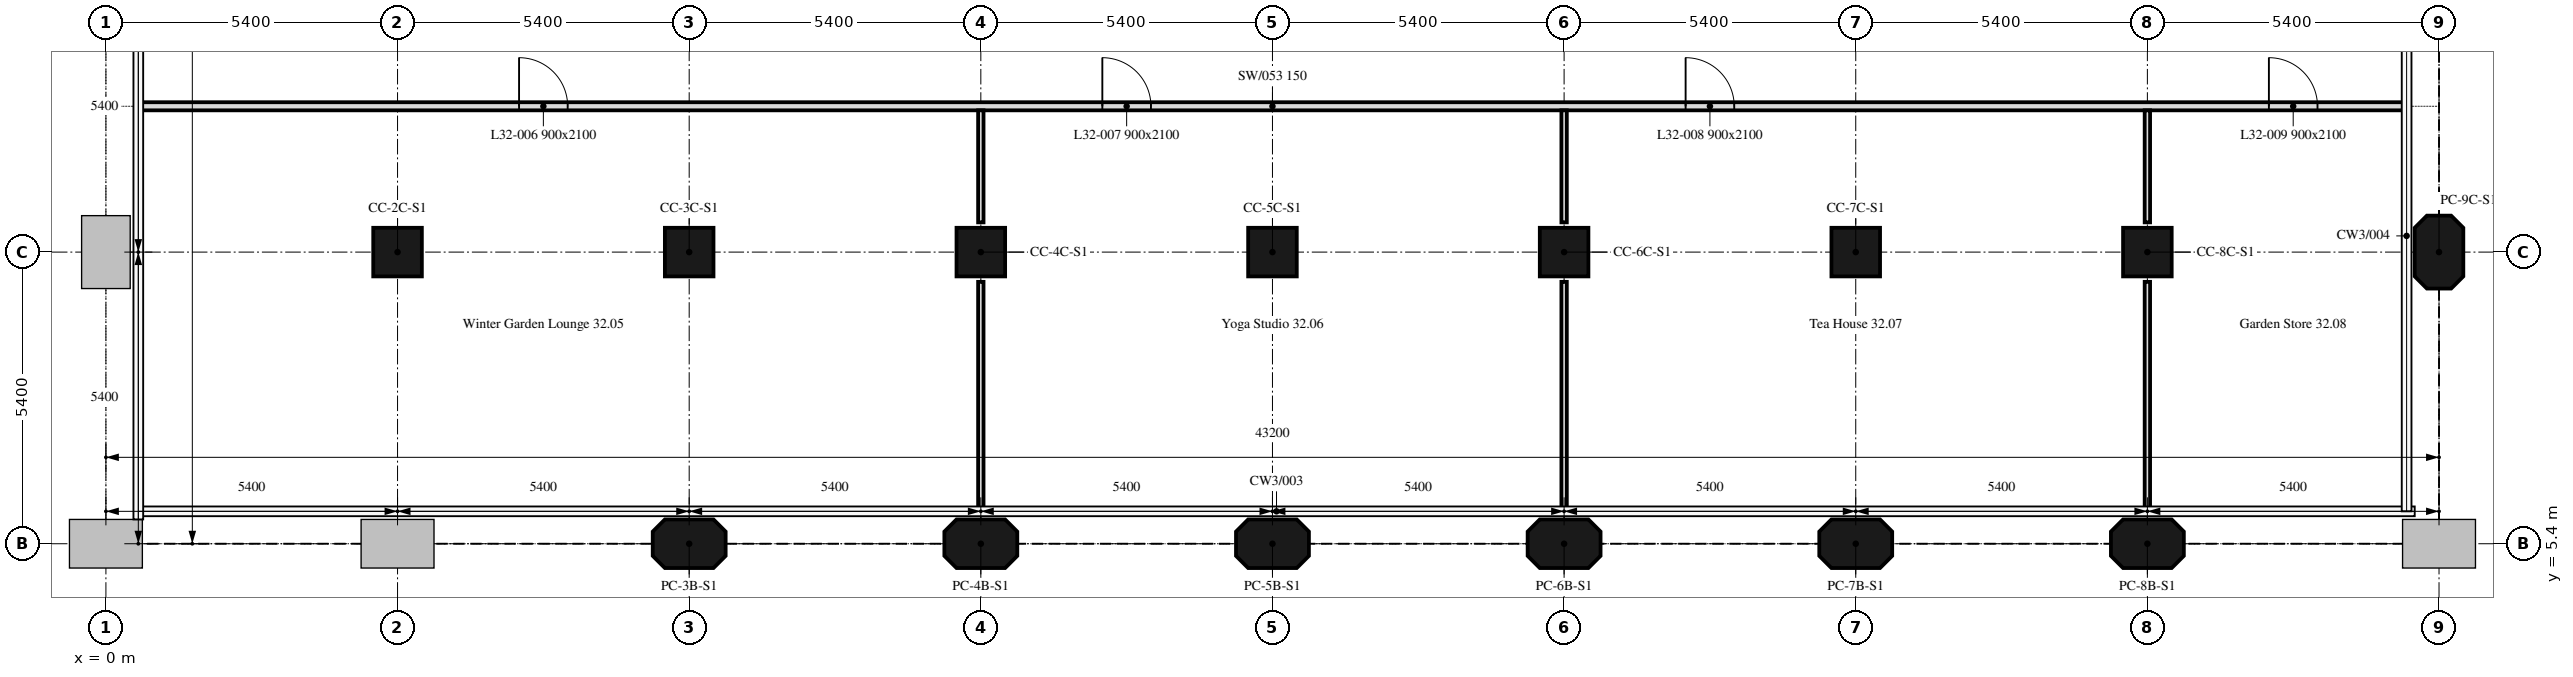
"""IFC4 building model, lengths in metres.
Left out: names, types, materials, properties, quantities, classifications, styles, units other than length and angle.
Written with IfcOpenShell. Run it as: python <this file> out.ifc"""

import sys

from ifc_helpers import new_model, si_unit, direction, frame, frame_2d, origin, origin_2d, place, context, subcontext, project, spatial, polyline, rectangle, outline, extrude, element, fill, save


model = new_model("IFC4")
c1 = context("Model", 3, precision=1e-05, world=origin(), true_north=direction((0.0, 1.0)))
c2 = subcontext(c1, "Body", "Model", "MODEL_VIEW")
j1 = project(units=[si_unit("LENGTHUNIT", "METRE"), si_unit("PLANEANGLEUNIT", "RADIAN")], contexts=[c1])
p1 = place(None, origin())
s1 = spatial("IfcSite", under=j1, at=p1, CompositionType="ELEMENT")
p2 = place(p1, origin())
s2 = spatial("IfcBuilding", under=s1, at=p2, CompositionType="ELEMENT")
p3 = place(p2, frame((0.0, 0.0, 138.4)))
s3 = spatial("IfcBuildingStorey", under=s2, at=p3, CompositionType="ELEMENT", Elevation=138.4)
for number, where, z_axis, x_axis in (
    (1, (10.8, 5.4, 0.0), (0.0, 0.0, 1.0), (1.0, 0.0, 0.0)),
    (2, (16.2, 5.4, 0.0), (0.0, 0.0, 1.0), (1.0, 0.0, 0.0)),
    (3, (21.6, 5.4, 0.0), (0.0, 0.0, 1.0), (1.0, 0.0, 0.0)),
    (4, (27.0, 5.4, 0.0), (0.0, 0.0, 1.0), (1.0, 0.0, 0.0)),
    (5, (32.4, 5.4, 0.0), (0.0, 0.0, 1.0), (1.0, 0.0, 0.0)),
    (6, (37.8, 5.4, 0.0), (0.0, 0.0, 1.0), (1.0, 0.0, 0.0)),
):
    element("IfcColumn", number, at=place(p3, frame(where, z_axis=z_axis, x_axis=x_axis)), inside=s3, PredefinedType="COLUMN", context=c2, shape_type="SweptSolid", body=[
        extrude(outline(polyline([(-0.45, -0.45), (0.45, -0.45), (0.675, -0.225), (0.675, 0.225), (0.45, 0.45), (-0.45, 0.45), (-0.675, 0.225), (-0.675, -0.225), (-0.45, -0.45)])), origin(), (0.0, 0.0, 1.0), 4.5),
    ])
for number, where, z_axis, x_axis in (
    (7, (5.4, 10.8, 0.0), (0.0, 0.0, 1.0), (1.0, 0.0, 0.0)),
    (8, (10.8, 10.8, 0.0), (0.0, 0.0, 1.0), (1.0, 0.0, 0.0)),
    (9, (16.2, 10.8, 0.0), (0.0, 0.0, 1.0), (1.0, 0.0, 0.0)),
    (10, (21.6, 10.8, 0.0), (0.0, 0.0, 1.0), (1.0, 0.0, 0.0)),
    (11, (27.0, 10.8, 0.0), (0.0, 0.0, 1.0), (1.0, 0.0, 0.0)),
    (12, (32.4, 10.8, 0.0), (0.0, 0.0, 1.0), (1.0, 0.0, 0.0)),
    (13, (37.8, 10.8, 0.0), (0.0, 0.0, 1.0), (1.0, 0.0, 0.0)),
):
    element("IfcColumn", number, at=place(p3, frame(where, z_axis=z_axis, x_axis=x_axis)), inside=s3, PredefinedType="COLUMN", context=c2, shape_type="SweptSolid", body=[
        extrude(rectangle(XDim=0.9, YDim=0.9, at=origin_2d()), origin(), (0.0, 0.0, 1.0), 4.5),
    ])
p4 = place(p3, frame((43.2, 10.8, 0.0), z_axis=(0.0, 0.0, 1.0), x_axis=(0.0, 1.0, 0.0)))
e14 = element("IfcColumn", 14, at=p4, inside=s3, PredefinedType="COLUMN", context=c2, shape_type="SweptSolid", body=[
    extrude(outline(polyline([(-0.45, -0.45), (0.45, -0.45), (0.675, -0.225), (0.675, 0.225), (0.45, 0.45), (-0.45, 0.45), (-0.675, 0.225), (-0.675, -0.225), (-0.45, -0.45)])), origin(), (0.0, 0.0, 1.0), 4.5),
])
p5 = place(p3, frame((0.6, 13.5, 0.0), z_axis=(0.0, 0.0, 1.0), x_axis=(1.0, 0.0, 0.0)))
e15 = element("IfcWall", 15, at=p5, inside=s3, PredefinedType="PARTITIONING", context=c2, shape_type="SweptSolid", body=[
    extrude(rectangle(XDim=42.0, YDim=0.15, at=frame_2d((21.0, 0.0))), origin(), (0.0, 0.0, 1.0), 4.5),
])
p6 = place(p5, frame((7.05, 0.0, 0.0)))
e16 = element("IfcOpeningElement", 16, at=p6, cuts=e15, PredefinedType="OPENING", context=c2, shape_type="SweptSolid", body=[
    extrude(rectangle(XDim=0.9, YDim=2.1, at=frame_2d((0.45, 1.05))), frame((0.0, 0.075, 0.0), z_axis=(0.0, -1.0, 0.0), x_axis=(1.0, 0.0, 0.0)), (0.0, 0.0, 1.0), 0.15),
])
p7 = place(p5, frame((17.85, 0.0, 0.0)))
e17 = element("IfcOpeningElement", 17, at=p7, cuts=e15, PredefinedType="OPENING", context=c2, shape_type="SweptSolid", body=[
    extrude(rectangle(XDim=0.9, YDim=2.1, at=frame_2d((0.45, 1.05))), frame((0.0, 0.075, 0.0), z_axis=(0.0, -1.0, 0.0), x_axis=(1.0, 0.0, 0.0)), (0.0, 0.0, 1.0), 0.15),
])
p8 = place(p5, frame((28.65, 0.0, 0.0)))
e18 = element("IfcOpeningElement", 18, at=p8, cuts=e15, PredefinedType="OPENING", context=c2, shape_type="SweptSolid", body=[
    extrude(rectangle(XDim=0.9, YDim=2.1, at=frame_2d((0.45, 1.05))), frame((0.0, 0.075, 0.0), z_axis=(0.0, -1.0, 0.0), x_axis=(1.0, 0.0, 0.0)), (0.0, 0.0, 1.0), 0.15),
])
p9 = place(p5, frame((39.45, 0.0, 0.0)))
e19 = element("IfcOpeningElement", 19, at=p9, cuts=e15, PredefinedType="OPENING", context=c2, shape_type="SweptSolid", body=[
    extrude(rectangle(XDim=0.9, YDim=2.1, at=frame_2d((0.45, 1.05))), frame((0.0, 0.075, 0.0), z_axis=(0.0, -1.0, 0.0), x_axis=(1.0, 0.0, 0.0)), (0.0, 0.0, 1.0), 0.15),
])
p10 = place(p3, frame((16.2, 6.0, 0.0), z_axis=(0.0, 0.0, 1.0), x_axis=(0.0, 1.0, 0.0)))
e20 = element("IfcWall", 20, at=p10, inside=s3, PredefinedType="PARTITIONING", context=c2, shape_type="SweptSolid", body=[
    extrude(rectangle(XDim=4.249, YDim=0.1, at=frame_2d((2.125, 0.0))), origin(), (0.0, 0.0, 1.0), 4.5),
])
p11 = place(p3, frame((16.2, 11.351, 0.0), z_axis=(0.0, 0.0, 1.0), x_axis=(0.0, 1.0, 0.0)))
e21 = element("IfcWall", 21, at=p11, inside=s3, PredefinedType="PARTITIONING", context=c2, shape_type="SweptSolid", body=[
    extrude(rectangle(XDim=2.074, YDim=0.1, at=frame_2d((1.037, 0.0))), origin(), (0.0, 0.0, 1.0), 4.5),
])
p12 = place(p3, frame((27.0, 6.0, 0.0), z_axis=(0.0, 0.0, 1.0), x_axis=(0.0, 1.0, 0.0)))
e22 = element("IfcWall", 22, at=p12, inside=s3, PredefinedType="PARTITIONING", context=c2, shape_type="SweptSolid", body=[
    extrude(rectangle(XDim=4.249, YDim=0.1, at=frame_2d((2.125, 0.0))), origin(), (0.0, 0.0, 1.0), 4.5),
])
p13 = place(p3, frame((27.0, 11.351, 0.0), z_axis=(0.0, 0.0, 1.0), x_axis=(0.0, 1.0, 0.0)))
e23 = element("IfcWall", 23, at=p13, inside=s3, PredefinedType="PARTITIONING", context=c2, shape_type="SweptSolid", body=[
    extrude(rectangle(XDim=2.074, YDim=0.1, at=frame_2d((1.037, 0.0))), origin(), (0.0, 0.0, 1.0), 4.5),
])
p14 = place(p3, frame((37.8, 6.0, 0.0), z_axis=(0.0, 0.0, 1.0), x_axis=(0.0, 1.0, 0.0)))
e24 = element("IfcWall", 24, at=p14, inside=s3, PredefinedType="PARTITIONING", context=c2, shape_type="SweptSolid", body=[
    extrude(rectangle(XDim=4.249, YDim=0.1, at=frame_2d((2.125, 0.0))), origin(), (0.0, 0.0, 1.0), 4.5),
])
p15 = place(p3, frame((37.8, 11.351, 0.0), z_axis=(0.0, 0.0, 1.0), x_axis=(0.0, 1.0, 0.0)))
e25 = element("IfcWall", 25, at=p15, inside=s3, PredefinedType="PARTITIONING", context=c2, shape_type="SweptSolid", body=[
    extrude(rectangle(XDim=2.074, YDim=0.1, at=frame_2d((1.037, 0.0))), origin(), (0.0, 0.0, 1.0), 4.5),
])
p16 = place(p6, origin())
e26 = element("IfcDoor", 26, at=p16, inside=s3, OperationType="SINGLE_SWING_RIGHT", PredefinedType="DOOR", context=c2, shape_type="SweptSolid", body=[
    extrude(rectangle(XDim=0.9, YDim=2.1, at=frame_2d((0.45, 1.05))), frame((0.0, 0.025, 0.0), z_axis=(0.0, -1.0, 0.0), x_axis=(1.0, 0.0, 0.0)), (0.0, 0.0, 1.0), 0.05),
])
fill(e16, e26)
p17 = place(p7, origin())
e27 = element("IfcDoor", 27, at=p17, inside=s3, OperationType="SINGLE_SWING_RIGHT", PredefinedType="DOOR", context=c2, shape_type="SweptSolid", body=[
    extrude(rectangle(XDim=0.9, YDim=2.1, at=frame_2d((0.45, 1.05))), frame((0.0, 0.025, 0.0), z_axis=(0.0, -1.0, 0.0), x_axis=(1.0, 0.0, 0.0)), (0.0, 0.0, 1.0), 0.05),
])
fill(e17, e27)
p18 = place(p8, origin())
e28 = element("IfcDoor", 28, at=p18, inside=s3, OperationType="SINGLE_SWING_RIGHT", PredefinedType="DOOR", context=c2, shape_type="SweptSolid", body=[
    extrude(rectangle(XDim=0.9, YDim=2.1, at=frame_2d((0.45, 1.05))), frame((0.0, 0.025, 0.0), z_axis=(0.0, -1.0, 0.0), x_axis=(1.0, 0.0, 0.0)), (0.0, 0.0, 1.0), 0.05),
])
fill(e18, e28)
p19 = place(p9, origin())
e29 = element("IfcDoor", 29, at=p19, inside=s3, OperationType="SINGLE_SWING_LEFT", PredefinedType="DOOR", context=c2, shape_type="SweptSolid", body=[
    extrude(rectangle(XDim=0.9, YDim=2.1, at=frame_2d((0.45, 1.05))), frame((0.0, 0.025, 0.0), z_axis=(0.0, -1.0, 0.0), x_axis=(1.0, 0.0, 0.0)), (0.0, 0.0, 1.0), 0.05),
])
fill(e19, e29)
save(model, sys.argv[1])
